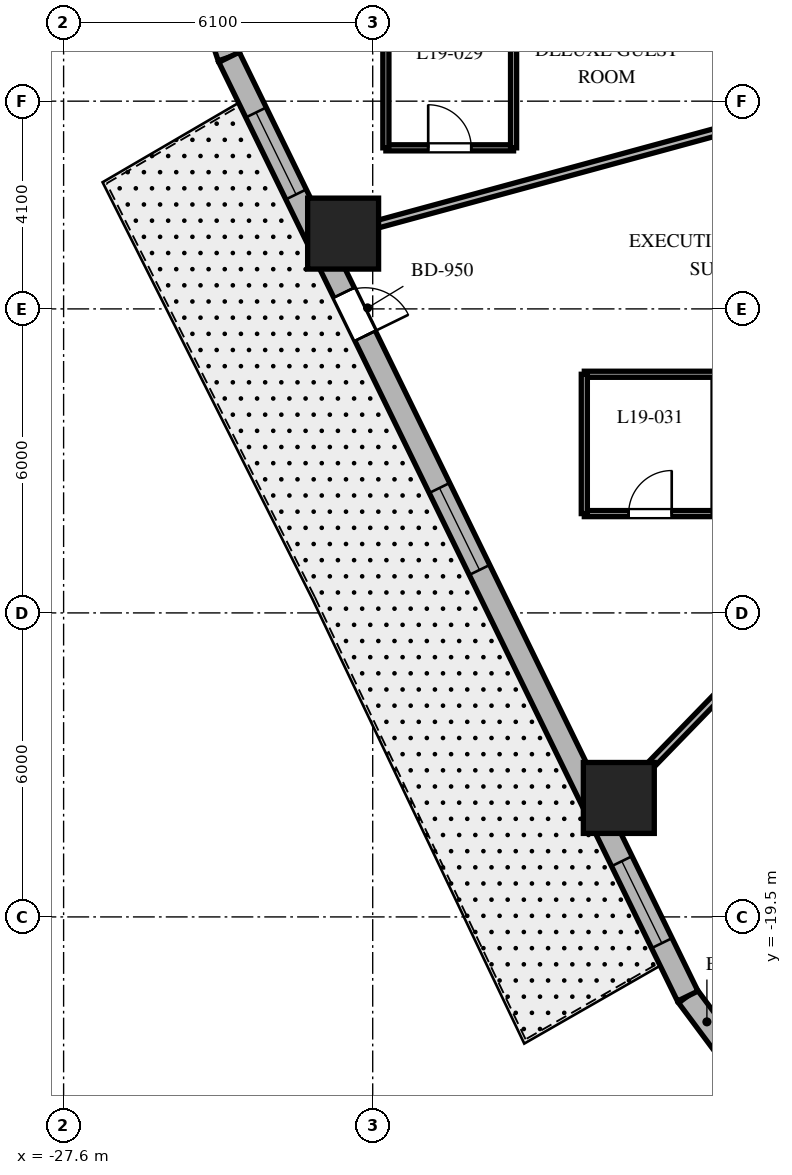
"""IFC4 building model, lengths in metres.
Left out: names, types, materials, properties, quantities, classifications, styles, units other than length and angle.
Written with IfcOpenShell. Run it as: python <this file> out.ifc"""

import sys

from ifc_helpers import new_model, si_unit, direction, frame, frame_2d, origin, origin_2d, place, context, subcontext, project, spatial, rectangle, extrude, element, fill, save


model = new_model("IFC4")
c1 = context("Model", 3, precision=1e-05, world=origin(), true_north=direction((0.0, 1.0)))
c2 = subcontext(c1, "Body", "Model", "MODEL_VIEW")
j1 = project(units=[si_unit("LENGTHUNIT", "METRE"), si_unit("PLANEANGLEUNIT", "RADIAN")], contexts=[c1])
p1 = place(None, origin())
s1 = spatial("IfcSite", under=j1, at=p1, CompositionType="ELEMENT")
p2 = place(p1, origin())
s2 = spatial("IfcBuilding", under=s1, at=p2, CompositionType="ELEMENT")
p3 = place(p2, frame((0.0, 0.0, 82.3)))
s3 = spatial("IfcBuildingStorey", under=s2, at=p3, CompositionType="ELEMENT", Elevation=82.3)
for number, where, z_axis, x_axis in (
    (1, (-22.084, -6.014, 0.0), (0.0, 0.0, 1.0), (1.0, 0.0, 0.0)),
    (2, (-16.643, -17.152, 0.0), (0.0, 0.0, 1.0), (1.0, 0.0, 0.0)),
):
    element("IfcColumn", number, at=place(p3, frame(where, z_axis=z_axis, x_axis=x_axis)), inside=s3, PredefinedType="COLUMN", context=c2, shape_type="SweptSolid", body=[
        extrude(rectangle(XDim=1.4, YDim=1.4, at=origin_2d()), origin(), (0.0, 0.0, 1.0), 3.7),
    ])
p4 = place(p3, frame((-15.284, -21.062, 0.0), z_axis=(0.0, 0.0, 1.0), x_axis=(0.597595366449, -0.801797841104, 0.0)))
e3 = element("IfcWall", 3, at=p4, inside=s3, PredefinedType="SOLIDWALL", context=c2, shape_type="SweptSolid", body=[
    extrude(rectangle(XDim=1.269, YDim=0.45, at=frame_2d((0.634, 0.0))), origin(), (0.0, 0.0, 1.0), 3.38),
])
p5 = place(p3, frame((-24.621, -1.682, 0.0), z_axis=(0.0, 0.0, 1.0), x_axis=(0.317697451681, -0.948192137278, 0.0)))
e4 = element("IfcWall", 4, at=p5, inside=s3, PredefinedType="SOLIDWALL", context=c2, shape_type="SweptSolid", body=[
    extrude(rectangle(XDim=0.897, YDim=0.45, at=frame_2d((0.448, 0.0))), origin(), (0.0, 0.0, 1.0), 3.38),
])
p6 = place(p3, frame((-24.336, -2.532, 0.0), z_axis=(0.0, 0.0, 1.0), x_axis=(0.438931326393, -0.898520612291, 0.0)))
e5 = element("IfcWall", 5, at=p6, inside=s3, PredefinedType="SOLIDWALL", context=c2, shape_type="SweptSolid", body=[
    extrude(rectangle(XDim=20.623, YDim=0.45, at=frame_2d((10.312, 0.0))), origin(), (0.0, 0.0, 1.0), 3.38),
])
p7 = place(p6, frame((5.171, 0.0, 0.0)))
e6 = element("IfcOpeningElement", 6, at=p7, cuts=e5, PredefinedType="OPENING", context=c2, shape_type="SweptSolid", body=[
    extrude(rectangle(XDim=0.95, YDim=2.15, at=frame_2d((0.475, 1.075))), frame((0.0, 0.235, 0.0), z_axis=(0.0, -1.0, 0.0), x_axis=(1.0, 0.0, 0.0)), (0.0, 0.0, 1.0), 0.47),
])
p8 = place(p6, frame((1.214, 0.0, 0.8)))
e7 = element("IfcOpeningElement", 7, at=p8, cuts=e5, PredefinedType="OPENING", context=c2, shape_type="SweptSolid", body=[
    extrude(rectangle(XDim=1.8, YDim=1.8, at=frame_2d((0.9, 0.9))), frame((0.0, 0.235, 0.0), z_axis=(0.0, -1.0, 0.0), x_axis=(1.0, 0.0, 0.0)), (0.0, 0.0, 1.0), 0.47),
])
p9 = place(p6, frame((9.462, 0.0, 0.8)))
e8 = element("IfcOpeningElement", 8, at=p9, cuts=e5, PredefinedType="OPENING", context=c2, shape_type="SweptSolid", body=[
    extrude(rectangle(XDim=1.8, YDim=1.8, at=frame_2d((0.9, 0.9))), frame((0.0, 0.235, 0.0), z_axis=(0.0, -1.0, 0.0), x_axis=(1.0, 0.0, 0.0)), (0.0, 0.0, 1.0), 0.47),
])
p10 = place(p6, frame((17.66, 0.0, 0.8)))
e9 = element("IfcOpeningElement", 9, at=p10, cuts=e5, PredefinedType="OPENING", context=c2, shape_type="SweptSolid", body=[
    extrude(rectangle(XDim=1.8, YDim=1.8, at=frame_2d((0.9, 0.9))), frame((0.0, 0.235, 0.0), z_axis=(0.0, -1.0, 0.0), x_axis=(1.0, 0.0, 0.0)), (0.0, 0.0, 1.0), 0.47),
])
p11 = place(p3, frame((-11.35, -3.091, 0.0), z_axis=(0.0, 0.0, 1.0), x_axis=(-0.964859685283, -0.262765651704, 0.0)))
e10 = element("IfcWall", 10, at=p11, inside=s3, PredefinedType="PARTITIONING", context=c2, shape_type="SweptSolid", body=[
    extrude(rectangle(XDim=11.629, YDim=0.15, at=frame_2d((5.814, 0.0))), origin(), (0.0, 0.0, 1.0), 2.52),
])
p12 = place(p3, frame((-9.558, -9.85, 0.0), z_axis=(0.0, 0.0, 1.0), x_axis=(-0.69638346089, -0.717669893056, 0.0)))
e11 = element("IfcWall", 11, at=p12, inside=s3, PredefinedType="PARTITIONING", context=c2, shape_type="SweptSolid", body=[
    extrude(rectangle(XDim=10.701, YDim=0.15, at=frame_2d((5.351, 0.0))), origin(), (0.0, 0.0, 1.0), 2.52),
])
p13 = place(p3, frame((-21.24, -4.321, 0.0), z_axis=(0.0, 0.0, 1.0), x_axis=(1.0, 0.0, 0.0)))
e12 = element("IfcWall", 12, at=p13, inside=s3, PredefinedType="PARTITIONING", context=c2, shape_type="SweptSolid", body=[
    extrude(rectangle(XDim=2.52, YDim=0.12, at=frame_2d((1.26, 0.0))), origin(), (0.0, 0.0, 1.0), 3.38),
])
p14 = place(p13, frame((0.835, 0.0, 0.0)))
e13 = element("IfcOpeningElement", 13, at=p14, cuts=e12, PredefinedType="OPENING", context=c2, shape_type="SweptSolid", body=[
    extrude(rectangle(XDim=0.85, YDim=2.03, at=frame_2d((0.425, 1.015))), frame((0.0, 0.07, 0.0), z_axis=(0.0, -1.0, 0.0), x_axis=(1.0, 0.0, 0.0)), (0.0, 0.0, 1.0), 0.14),
])
for number, where, z_axis, x_axis in (
    (14, (-18.72, -4.321, 0.0), (0.0, 0.0, 1.0), (0.0, 1.0, 0.0)),
    (15, (-21.24, -1.641, 0.0), (0.0, 0.0, 1.0), (0.0, -1.0, 0.0)),
):
    element("IfcWall", number, at=place(p3, frame(where, z_axis=z_axis, x_axis=x_axis)), inside=s3, PredefinedType="PARTITIONING", context=c2, shape_type="SweptSolid", body=[
        extrude(rectangle(XDim=2.68, YDim=0.12, at=frame_2d((1.34, 0.0))), origin(), (0.0, 0.0, 1.0), 3.38),
    ])
p15 = place(p3, frame((-17.324, -11.54, 0.0), z_axis=(0.0, 0.0, 1.0), x_axis=(1.0, 0.0, 0.0)))
e16 = element("IfcWall", 16, at=p15, inside=s3, PredefinedType="PARTITIONING", context=c2, shape_type="SweptSolid", body=[
    extrude(rectangle(XDim=2.6, YDim=0.12, at=frame_2d((1.3, 0.0))), origin(), (0.0, 0.0, 1.0), 2.906),
])
p16 = place(p15, frame((0.875, 0.0, 0.0)))
e17 = element("IfcOpeningElement", 17, at=p16, cuts=e16, PredefinedType="OPENING", context=c2, shape_type="SweptSolid", body=[
    extrude(rectangle(XDim=0.85, YDim=2.03, at=frame_2d((0.425, 1.015))), frame((0.0, 0.07, 0.0), z_axis=(0.0, -1.0, 0.0), x_axis=(1.0, 0.0, 0.0)), (0.0, 0.0, 1.0), 0.14),
])
p17 = place(p3, frame((-14.724, -8.79, 0.0), z_axis=(0.0, 0.0, 1.0), x_axis=(-1.0, 0.0, 0.0)))
e18 = element("IfcWall", 18, at=p17, inside=s3, PredefinedType="PARTITIONING", context=c2, shape_type="SweptSolid", body=[
    extrude(rectangle(XDim=2.6, YDim=0.12, at=frame_2d((1.3, 0.0))), origin(), (0.0, 0.0, 1.0), 2.906),
])
p18 = place(p3, frame((-17.324, -8.79, 0.0), z_axis=(0.0, 0.0, 1.0), x_axis=(0.0, -1.0, 0.0)))
e19 = element("IfcWall", 19, at=p18, inside=s3, PredefinedType="PARTITIONING", context=c2, shape_type="SweptSolid", body=[
    extrude(rectangle(XDim=2.75, YDim=0.12, at=frame_2d((1.375, 0.0))), origin(), (0.0, 0.0, 1.0), 3.38),
])
p19 = place(p7, origin())
e20 = element("IfcDoor", 20, at=p19, inside=s3, OperationType="SINGLE_SWING_RIGHT", PredefinedType="DOOR", context=c2, shape_type="SweptSolid", body=[
    extrude(rectangle(XDim=0.95, YDim=2.15, at=frame_2d((0.475, 1.075))), frame((0.0, 0.025, 0.0), z_axis=(0.0, -1.0, 0.0), x_axis=(1.0, 0.0, 0.0)), (0.0, 0.0, 1.0), 0.05),
])
fill(e6, e20)
p20 = place(p8, origin())
e21 = element("IfcWindow", 21, at=p20, inside=s3, PartitioningType="SINGLE_PANEL", PredefinedType="WINDOW", context=c2, shape_type="SweptSolid", body=[
    extrude(rectangle(XDim=1.8, YDim=1.8, at=frame_2d((0.9, 0.9))), frame((0.0, 0.03, 0.0), z_axis=(0.0, -1.0, 0.0), x_axis=(1.0, 0.0, 0.0)), (0.0, 0.0, 1.0), 0.06),
])
fill(e7, e21)
p21 = place(p9, origin())
e22 = element("IfcWindow", 22, at=p21, inside=s3, PartitioningType="SINGLE_PANEL", PredefinedType="WINDOW", context=c2, shape_type="SweptSolid", body=[
    extrude(rectangle(XDim=1.8, YDim=1.8, at=frame_2d((0.9, 0.9))), frame((0.0, 0.03, 0.0), z_axis=(0.0, -1.0, 0.0), x_axis=(1.0, 0.0, 0.0)), (0.0, 0.0, 1.0), 0.06),
])
fill(e8, e22)
p22 = place(p10, origin())
e23 = element("IfcWindow", 23, at=p22, inside=s3, PartitioningType="SINGLE_PANEL", PredefinedType="WINDOW", context=c2, shape_type="SweptSolid", body=[
    extrude(rectangle(XDim=1.8, YDim=1.8, at=frame_2d((0.9, 0.9))), frame((0.0, 0.03, 0.0), z_axis=(0.0, -1.0, 0.0), x_axis=(1.0, 0.0, 0.0)), (0.0, 0.0, 1.0), 0.06),
])
fill(e9, e23)
p23 = place(p14, origin())
e24 = element("IfcDoor", 24, at=p23, inside=s3, OperationType="SINGLE_SWING_LEFT", PredefinedType="DOOR", context=c2, shape_type="SweptSolid", body=[
    extrude(rectangle(XDim=0.85, YDim=2.03, at=frame_2d((0.425, 1.015))), frame((0.0, 0.025, 0.0), z_axis=(0.0, -1.0, 0.0), x_axis=(1.0, 0.0, 0.0)), (0.0, 0.0, 1.0), 0.05),
])
fill(e13, e24)
p24 = place(p16, origin())
e25 = element("IfcDoor", 25, at=p24, inside=s3, OperationType="SINGLE_SWING_RIGHT", PredefinedType="DOOR", context=c2, shape_type="SweptSolid", body=[
    extrude(rectangle(XDim=0.85, YDim=2.03, at=frame_2d((0.425, 1.015))), frame((0.0, 0.025, 0.0), z_axis=(0.0, -1.0, 0.0), x_axis=(1.0, 0.0, 0.0)), (0.0, 0.0, 1.0), 0.05),
])
fill(e17, e25)
save(model, sys.argv[1])
